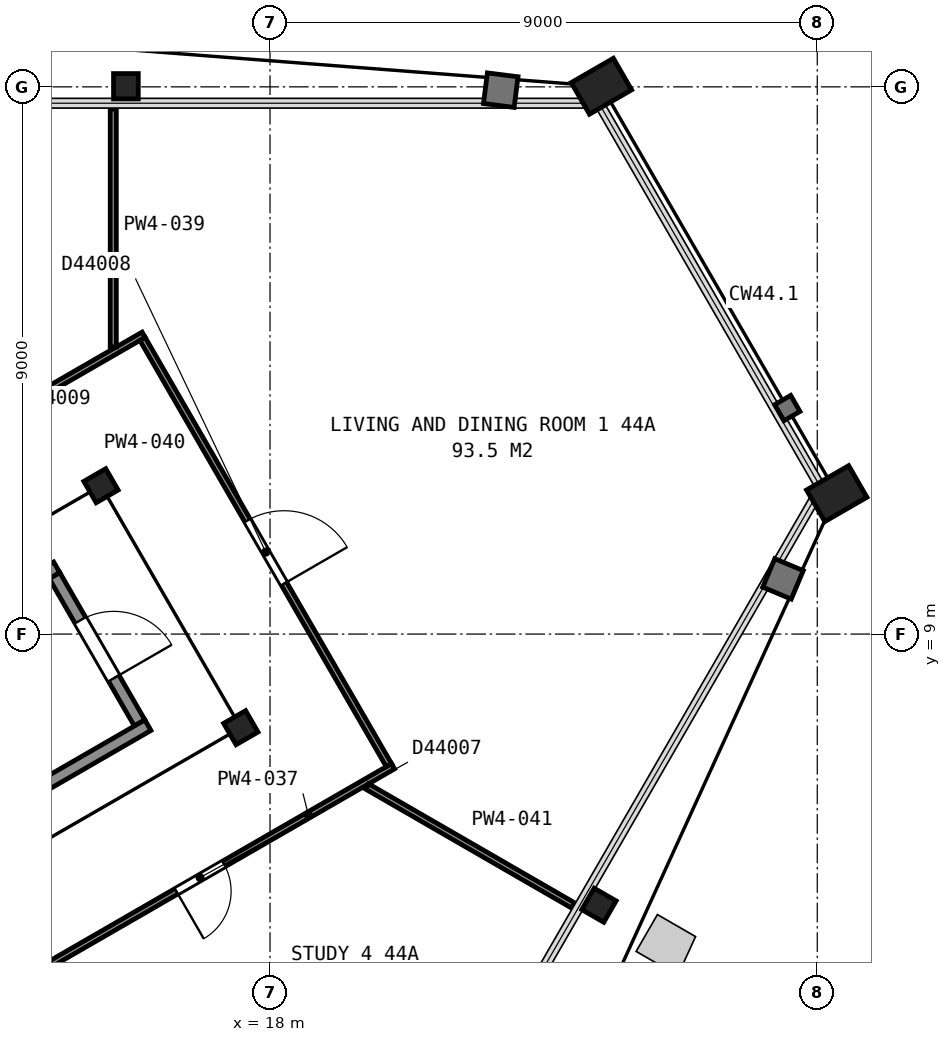
"""IFC4 building model, lengths in metres.
Left out: names, types, materials, properties, quantities, classifications, styles, units other than length and angle.
Written with IfcOpenShell. Run it as: python <this file> out.ifc"""

import sys

from ifc_helpers import new_model, si_unit, direction, frame, frame_2d, origin, origin_2d, place, context, subcontext, project, spatial, rectangle, hollow_rectangle, i_section, extrude, element, fill, save


model = new_model("IFC4")
c1 = context("Model", 3, precision=1e-05, world=origin(), true_north=direction((0.0, 1.0)))
c2 = subcontext(c1, "Body", "Model", "MODEL_VIEW")
j1 = project(units=[si_unit("LENGTHUNIT", "METRE"), si_unit("PLANEANGLEUNIT", "RADIAN")], contexts=[c1])
p1 = place(None, origin())
s1 = spatial("IfcSite", under=j1, at=p1, CompositionType="ELEMENT")
p2 = place(p1, origin())
s2 = spatial("IfcBuilding", under=s1, at=p2, CompositionType="ELEMENT")
p3 = place(p2, frame((0.0, 0.0, 178.4)))
s3 = spatial("IfcBuildingStorey", under=s2, at=p3, CompositionType="ELEMENT", Elevation=178.4)
p4 = place(p3, frame((23.45, 18.01, 0.065), z_axis=(0.0, 0.0, 1.0), x_axis=(0.5, -0.866025403784, 0.0)))
e1 = element("IfcColumn", 1, at=p4, inside=s3, PredefinedType="COLUMN", context=c2, shape_type="SweptSolid", body=[
    extrude(hollow_rectangle(XDim=0.6, YDim=0.8, WallThickness=0.05, at=origin_2d()), origin(), (0.0, 0.0, 1.0), 3.635),
])
for number, where, z_axis, x_axis in (
    (2, (15.63, 18.01, 0.04), (0.0, 0.0, 1.0), (1.0, 0.0, 0.0)),
    (3, (23.41, 4.54, 0.04), (0.0, 0.0, 1.0), (-0.5, -0.866, 0.0)),
):
    element("IfcColumn", number, at=place(p3, frame(where, z_axis=z_axis, x_axis=x_axis)), inside=s3, PredefinedType="COLUMN", context=c2, shape_type="SweptSolid", body=[
        extrude(i_section(OverallWidth=0.406, OverallDepth=0.417, WebThickness=0.03, FlangeThickness=0.048, FilletRadius=0.015, at=origin_2d()), origin(), (0.0, 0.0, 1.0), 3.66),
    ])
p5 = place(p3, frame((27.32, 11.31, 0.065), z_axis=(0.0, 0.0, 1.0), x_axis=(0.5, -0.866025403784, 0.0)))
e4 = element("IfcColumn", 4, at=p5, inside=s3, PredefinedType="COLUMN", context=c2, shape_type="SweptSolid", body=[
    extrude(hollow_rectangle(XDim=0.6, YDim=0.8, WallThickness=0.05, at=origin_2d()), origin(), (0.0, 0.0, 1.0), 3.635),
])
for number, where, z_axis, x_axis in (
    (5, (17.52, 7.46, 0.0), (0.0, 0.0, 1.0), (0.5, -0.866, 0.0)),
    (6, (15.22, 11.44, 0.0), (0.0, 0.0, 1.0), (0.5, -0.866, 0.0)),
):
    element("IfcColumn", number, at=place(p3, frame(where, z_axis=z_axis, x_axis=x_axis)), inside=s3, PredefinedType="COLUMN", context=c2, shape_type="SweptSolid", body=[
        extrude(i_section(OverallWidth=0.406, OverallDepth=0.417, WebThickness=0.03, FlangeThickness=0.048, FilletRadius=0.015, at=origin_2d()), origin(), (0.0, 0.0, 1.0), 3.7),
    ])
p6 = place(p3, frame((15.855, 7.538, 0.0), z_axis=(0.0, 0.0, 1.0), x_axis=(-0.500049511043, 0.865996816683, 0.0)))
e7 = element("IfcWall", 7, at=p6, inside=s3, PredefinedType="PARTITIONING", context=c2, shape_type="SweptSolid", body=[
    extrude(rectangle(XDim=2.8, YDim=0.2, at=frame_2d((1.4, 0.0))), origin(), (0.0, 0.0, 1.0), 3.45),
])
p7 = place(p6, frame((0.85, 0.0, 0.0)))
e8 = element("IfcOpeningElement", 8, at=p7, cuts=e7, PredefinedType="OPENING", context=c2, shape_type="SweptSolid", body=[
    extrude(rectangle(XDim=1.1, YDim=2.1, at=frame_2d((0.55, 1.05))), frame((0.0, 0.11, 0.0), z_axis=(0.0, -1.0, 0.0), x_axis=(1.0, 0.0, 0.0)), (0.0, 0.0, 1.0), 0.22),
])
for number, where, z_axis, x_axis in (
    (9, (6.178, 5.299, 0.0), (0.0, 0.0, 1.0), (0.866, 0.5, 0.0)),
    (10, (7.678, 2.701, 0.0), (0.0, 0.0, 1.0), (0.866, 0.5, 0.0)),
):
    element("IfcWall", number, at=place(p3, frame(where, z_axis=z_axis, x_axis=x_axis)), inside=s3, PredefinedType="PARTITIONING", context=c2, shape_type="SweptSolid", body=[
        extrude(rectangle(XDim=9.6, YDim=0.2, at=frame_2d((4.8, 0.0))), origin(), (0.0, 0.0, 1.0), 3.45),
    ])
p8 = place(p3, frame((8.852, 9.843, 0.0), z_axis=(0.0, 0.0, 1.0), x_axis=(0.866088973199, 0.499889878377, 0.0)))
e11 = element("IfcWall", 11, at=p8, inside=s3, PredefinedType="PARTITIONING", context=c2, shape_type="SweptSolid", body=[
    extrude(rectangle(XDim=8.163, YDim=0.1, at=frame_2d((4.082, 0.0))), origin(), (0.0, 0.0, 1.0), 2.713),
])
p9 = place(p8, frame((4.583, 0.0, 0.0)))
e12 = element("IfcOpeningElement", 12, at=p9, cuts=e11, PredefinedType="OPENING", context=c2, shape_type="SweptSolid", body=[
    extrude(rectangle(XDim=0.9, YDim=2.1, at=frame_2d((0.45, 1.05))), frame((0.0, 0.06, 0.0), z_axis=(0.0, -1.0, 0.0), x_axis=(1.0, 0.0, 0.0)), (0.0, 0.0, 1.0), 0.12),
])
p10 = place(p8, frame((0.715, 0.0, 0.0)))
e13 = element("IfcOpeningElement", 13, at=p10, cuts=e11, PredefinedType="OPENING", context=c2, shape_type="SweptSolid", body=[
    extrude(rectangle(XDim=0.9, YDim=2.1, at=frame_2d((0.45, 1.05))), frame((0.0, 0.06, 0.0), z_axis=(0.0, -1.0, 0.0), x_axis=(1.0, 0.0, 0.0)), (0.0, 0.0, 1.0), 0.12),
])
p11 = place(p3, frame((20.023, 6.826, 0.0), z_axis=(0.0, 0.0, 1.0), x_axis=(-0.866097124975, -0.499875754673, 0.0)))
e14 = element("IfcWall", 14, at=p11, inside=s3, PredefinedType="PARTITIONING", context=c2, shape_type="SweptSolid", body=[
    extrude(rectangle(XDim=8.18, YDim=0.1, at=frame_2d((4.09, 0.0))), origin(), (0.0, 0.0, 1.0), 2.713),
])
p12 = place(p11, frame((7.05, 0.0, 0.0)))
e15 = element("IfcOpeningElement", 15, at=p12, cuts=e14, PredefinedType="OPENING", context=c2, shape_type="SweptSolid", body=[
    extrude(rectangle(XDim=0.9, YDim=2.1, at=frame_2d((0.45, 1.05))), frame((0.0, 0.06, 0.0), z_axis=(0.0, -1.0, 0.0), x_axis=(1.0, 0.0, 0.0)), (0.0, 0.0, 1.0), 0.12),
])
p13 = place(p11, frame((3.214, 0.0, 0.0)))
e16 = element("IfcOpeningElement", 16, at=p13, cuts=e14, PredefinedType="OPENING", context=c2, shape_type="SweptSolid", body=[
    extrude(rectangle(XDim=0.9, YDim=2.1, at=frame_2d((0.45, 1.05))), frame((0.0, 0.06, 0.0), z_axis=(0.0, -1.0, 0.0), x_axis=(1.0, 0.0, 0.0)), (0.0, 0.0, 1.0), 0.12),
])
p14 = place(p3, frame((15.422, 13.722, 0.0), z_axis=(0.0, 0.0, 1.0), x_axis=(0.0, 1.0, 0.0)))
e17 = element("IfcWall", 17, at=p14, inside=s3, PredefinedType="PARTITIONING", context=c2, shape_type="SweptSolid", body=[
    extrude(rectangle(XDim=3.913, YDim=0.1, at=frame_2d((1.957, 0.0))), origin(), (0.0, 0.0, 1.0), 2.713),
])
p15 = place(p3, frame((15.903, 13.855, 0.0), z_axis=(0.0, 0.0, 1.0), x_axis=(0.500415732313, -0.865785247537, 0.0)))
e18 = element("IfcWall", 18, at=p15, inside=s3, PredefinedType="PARTITIONING", context=c2, shape_type="SweptSolid", body=[
    extrude(rectangle(XDim=8.097, YDim=0.1, at=frame_2d((4.049, 0.0))), origin(), (0.0, 0.0, 1.0), 2.713),
])
p16 = place(p15, frame((3.45, 0.0, 0.0)))
e19 = element("IfcOpeningElement", 19, at=p16, cuts=e18, PredefinedType="OPENING", context=c2, shape_type="SweptSolid", body=[
    extrude(rectangle(XDim=1.2, YDim=2.1, at=frame_2d((0.6, 1.05))), frame((0.0, 0.06, 0.0), z_axis=(0.0, -1.0, 0.0), x_axis=(1.0, 0.0, 0.0)), (0.0, 0.0, 1.0), 0.12),
])
p17 = place(p3, frame((19.596, 6.494, 0.0), z_axis=(0.0, 0.0, 1.0), x_axis=(0.865998449813, -0.500046682742, 0.0)))
e20 = element("IfcWall", 20, at=p17, inside=s3, PredefinedType="PARTITIONING", context=c2, shape_type="SweptSolid", body=[
    extrude(rectangle(XDim=3.911, YDim=0.1, at=frame_2d((1.956, 0.0))), origin(), (0.0, 0.0, 1.0), 2.713),
])
p18 = place(p7, origin())
e21 = element("IfcDoor", 21, at=p18, inside=s3, OperationType="SINGLE_SWING_LEFT", PredefinedType="DOOR", context=c2, shape_type="SweptSolid", body=[
    extrude(rectangle(XDim=1.1, YDim=2.1, at=frame_2d((0.55, 1.05))), frame((0.0, 0.025, 0.0), z_axis=(0.0, -1.0, 0.0), x_axis=(1.0, 0.0, 0.0)), (0.0, 0.0, 1.0), 0.05),
])
fill(e8, e21)
p19 = place(p13, origin())
e22 = element("IfcDoor", 22, at=p19, inside=s3, OperationType="SINGLE_SWING_RIGHT", PredefinedType="DOOR", context=c2, shape_type="SweptSolid", body=[
    extrude(rectangle(XDim=0.9, YDim=2.1, at=frame_2d((0.45, 1.05))), frame((0.0, 0.025, 0.0), z_axis=(0.0, -1.0, 0.0), x_axis=(1.0, 0.0, 0.0)), (0.0, 0.0, 1.0), 0.05),
])
fill(e16, e22)
p20 = place(p16, origin())
e23 = element("IfcDoor", 23, at=p20, inside=s3, OperationType="SINGLE_SWING_RIGHT", PredefinedType="DOOR", context=c2, shape_type="SweptSolid", body=[
    extrude(rectangle(XDim=1.2, YDim=2.1, at=frame_2d((0.6, 1.05))), frame((0.0, 0.025, 0.0), z_axis=(0.0, -1.0, 0.0), x_axis=(1.0, 0.0, 0.0)), (0.0, 0.0, 1.0), 0.05),
])
fill(e19, e23)
save(model, sys.argv[1])
